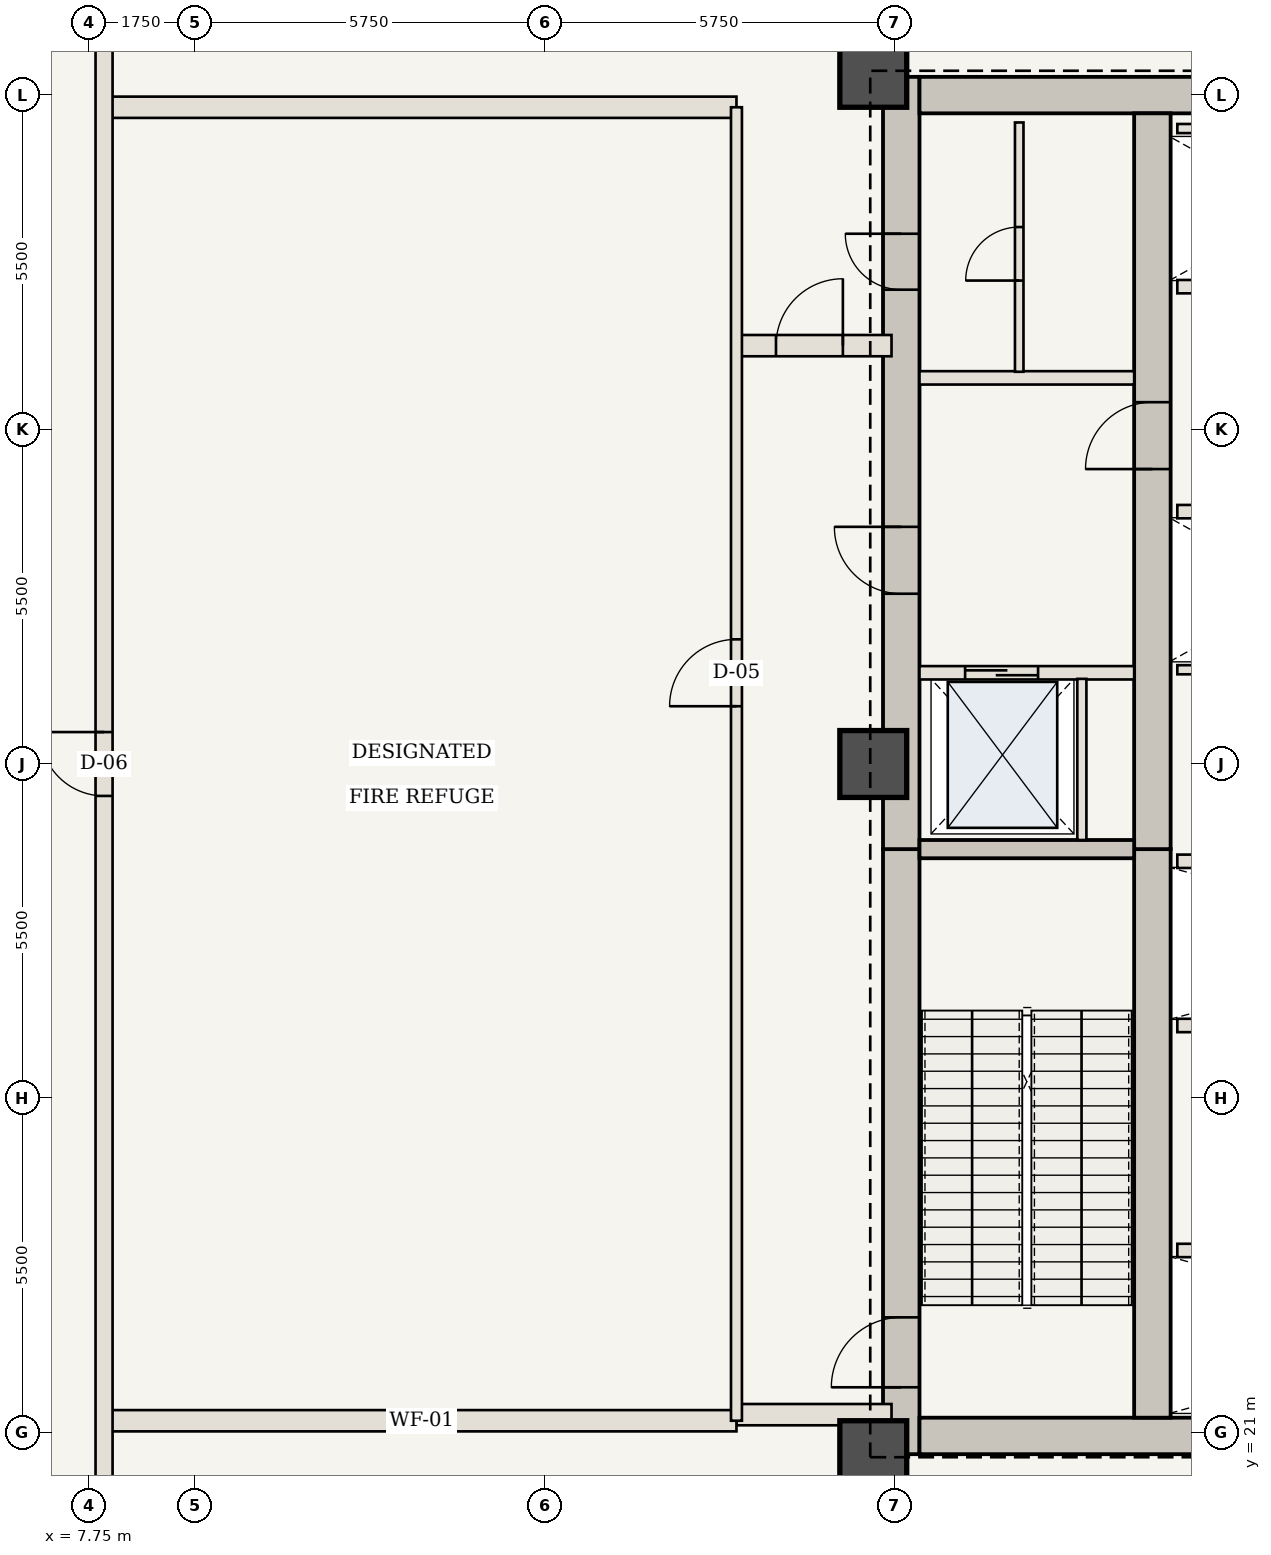
"""IFC4 building model, lengths in metres.
Left out: names, types, materials, properties, quantities, classifications, styles, units other than length and angle.
Written with IfcOpenShell. Run it as: python <this file> out.ifc"""

import sys

from ifc_helpers import new_model, si_unit, direction, frame, frame_2d, origin, origin_2d, place, context, subcontext, project, spatial, rectangle, extrude, element, fill, save


model = new_model("IFC4")
c1 = context("Model", 3, precision=1e-05, world=origin(), true_north=direction((0.0, 1.0)))
c2 = subcontext(c1, "Body", "Model", "MODEL_VIEW")
j1 = project(units=[si_unit("LENGTHUNIT", "METRE"), si_unit("PLANEANGLEUNIT", "RADIAN")], contexts=[c1])
p1 = place(None, origin())
s1 = spatial("IfcSite", under=j1, at=p1, CompositionType="ELEMENT")
p2 = place(p1, origin())
s2 = spatial("IfcBuilding", under=s1, at=p2, CompositionType="ELEMENT")
p3 = place(p2, frame((0.0, 0.0, 99.75)))
s3 = spatial("IfcBuildingStorey", under=s2, at=p3, CompositionType="ELEMENT", Elevation=99.75)
p4 = place(p3, frame((21.11, 20.65, 0.0), z_axis=(0.0, 0.0, 1.0), x_axis=(0.0, 1.0, 0.0)))
e1 = element("IfcWall", 1, at=p4, inside=s3, PredefinedType="SHEAR", context=c2, shape_type="SweptSolid", body=[
    extrude(rectangle(XDim=9.95, YDim=0.6, at=frame_2d((4.975, 0.0))), origin(), (0.0, 0.0, 1.0), 6.3),
])
p5 = place(p4, frame((1.1, 0.0, 0.0)))
e2 = element("IfcOpeningElement", 2, at=p5, cuts=e1, PredefinedType="OPENING", context=c2, shape_type="SweptSolid", body=[
    extrude(rectangle(XDim=1.15, YDim=2.15, at=frame_2d((0.575, 1.075))), frame((0.0, 0.31, 0.0), z_axis=(0.0, -1.0, 0.0), x_axis=(1.0, 0.0, 0.0)), (0.0, 0.0, 1.0), 0.62),
])
p6 = place(p3, frame((21.11, 30.6, 0.0), z_axis=(0.0, 0.0, 1.0), x_axis=(0.0, 1.0, 0.0)))
e3 = element("IfcWall", 3, at=p6, inside=s3, PredefinedType="SHEAR", context=c2, shape_type="SweptSolid", body=[
    extrude(rectangle(XDim=12.7, YDim=0.6, at=frame_2d((6.35, 0.0))), origin(), (0.0, 0.0, 1.0), 6.3),
])
p7 = place(p6, frame((4.2, 0.0, 0.0)))
e4 = element("IfcOpeningElement", 4, at=p7, cuts=e3, PredefinedType="OPENING", context=c2, shape_type="SweptSolid", body=[
    extrude(rectangle(XDim=1.1, YDim=2.15, at=frame_2d((0.55, 1.075))), frame((0.0, 0.31, 0.0), z_axis=(0.0, -1.0, 0.0), x_axis=(1.0, 0.0, 0.0)), (0.0, 0.0, 1.0), 0.62),
])
p8 = place(p6, frame((9.2, 0.0, 0.0)))
e5 = element("IfcOpeningElement", 5, at=p8, cuts=e3, PredefinedType="OPENING", context=c2, shape_type="SweptSolid", body=[
    extrude(rectangle(XDim=0.92, YDim=2.1, at=frame_2d((0.46, 1.05))), frame((0.0, 0.31, 0.0), z_axis=(0.0, -1.0, 0.0), x_axis=(1.0, 0.0, 0.0)), (0.0, 0.0, 1.0), 0.62),
])
p9 = place(p3, frame((21.41, 20.95, 0.0), z_axis=(0.0, 0.0, 1.0), x_axis=(1.0, 0.0, 0.0)))
e6 = element("IfcWall", 6, at=p9, inside=s3, PredefinedType="SHEAR", context=c2, shape_type="SweptSolid", body=[
    extrude(rectangle(XDim=13.74, YDim=0.6, at=frame_2d((6.87, 0.0))), origin(), (0.0, 0.0, 1.0), 6.3),
])
p10 = place(p3, frame((21.41, 43.0, 0.0), z_axis=(0.0, 0.0, 1.0), x_axis=(1.0, 0.0, 0.0)))
e7 = element("IfcWall", 7, at=p10, inside=s3, PredefinedType="SHEAR", context=c2, shape_type="SweptSolid", body=[
    extrude(rectangle(XDim=8.24, YDim=0.6, at=frame_2d((4.12, 0.0))), origin(), (0.0, 0.0, 1.0), 6.3),
])
p11 = place(p3, frame((25.24, 21.25, 0.0), z_axis=(0.0, 0.0, 1.0), x_axis=(0.0, 1.0, 0.0)))
e8 = element("IfcWall", 8, at=p11, inside=s3, PredefinedType="SHEAR", context=c2, shape_type="SweptSolid", body=[
    extrude(rectangle(XDim=9.35, YDim=0.6, at=frame_2d((4.675, 0.0))), origin(), (0.0, 0.0, 1.0), 6.3),
])
p12 = place(p3, frame((25.24, 30.6, 0.0), z_axis=(0.0, 0.0, 1.0), x_axis=(0.0, 1.0, 0.0)))
e9 = element("IfcWall", 9, at=p12, inside=s3, PredefinedType="SHEAR", context=c2, shape_type="SweptSolid", body=[
    extrude(rectangle(XDim=12.1, YDim=0.6, at=frame_2d((6.05, 0.0))), origin(), (0.0, 0.0, 1.0), 6.3),
])
p13 = place(p12, frame((6.25, 0.0, 0.0)))
e10 = element("IfcOpeningElement", 10, at=p13, cuts=e9, PredefinedType="OPENING", context=c2, shape_type="SweptSolid", body=[
    extrude(rectangle(XDim=1.1, YDim=2.15, at=frame_2d((0.55, 1.075))), frame((0.0, 0.31, 0.0), z_axis=(0.0, -1.0, 0.0), x_axis=(1.0, 0.0, 0.0)), (0.0, 0.0, 1.0), 0.62),
])
for number, where, z_axis, x_axis in (
    (11, (20.65, 20.65, 0.0), (0.0, 0.0, 1.0), (1.0, 0.0, 0.0)),
    (12, (20.65, 43.35, 0.0), (0.0, 0.0, 1.0), (1.0, 0.0, 0.0)),
    (13, (20.65, 32.0, 0.0), (0.0, 0.0, 1.0), (1.0, 0.0, 0.0)),
):
    element("IfcColumn", number, at=place(p3, frame(where, z_axis=z_axis, x_axis=x_axis)), inside=s3, PredefinedType="COLUMN", context=c2, shape_type="SweptSolid", body=[
        extrude(rectangle(XDim=1.1, YDim=1.1, at=origin_2d()), origin(), (0.0, 0.0, 1.0), 5.88),
    ])
p14 = place(p3, frame((21.41, 30.6, 0.0), z_axis=(0.0, 0.0, 1.0), x_axis=(1.0, 0.0, 0.0)))
e14 = element("IfcWall", 14, at=p14, inside=s3, PredefinedType="SHEAR", context=c2, shape_type="SweptSolid", body=[
    extrude(rectangle(XDim=3.53, YDim=0.3, at=frame_2d((1.765, 0.0))), origin(), (0.0, 0.0, 1.0), 5.88),
])
p15 = place(p3, frame((21.41, 33.5, 0.0), z_axis=(0.0, 0.0, 1.0), x_axis=(1.0, 0.0, 0.0)))
e15 = element("IfcWall", 15, at=p15, inside=s3, PredefinedType="STANDARD", context=c2, shape_type="SweptSolid", body=[
    extrude(rectangle(XDim=3.53, YDim=0.22, at=frame_2d((1.765, 0.0))), origin(), (0.0, 0.0, 1.0), 5.88),
])
p16 = place(p15, frame((0.75, 0.0, 0.0)))
e16 = element("IfcOpeningElement", 16, at=p16, cuts=e15, PredefinedType="OPENING", context=c2, shape_type="SweptSolid", body=[
    extrude(rectangle(XDim=1.2, YDim=2.2, at=frame_2d((0.6, 1.1))), frame((0.0, 0.12, 0.0), z_axis=(0.0, -1.0, 0.0), x_axis=(1.0, 0.0, 0.0)), (0.0, 0.0, 1.0), 0.24),
])
p17 = place(p3, frame((24.08, 30.75, 0.0), z_axis=(0.0, 0.0, 1.0), x_axis=(0.0, 1.0, 0.0)))
e17 = element("IfcWall", 17, at=p17, inside=s3, PredefinedType="STANDARD", context=c2, shape_type="SweptSolid", body=[
    extrude(rectangle(XDim=2.65, YDim=0.15, at=frame_2d((1.325, 0.0))), origin(), (0.0, 0.0, 1.0), 5.88),
])
p18 = place(p3, frame((21.41, 38.35, 0.0), z_axis=(0.0, 0.0, 1.0), x_axis=(1.0, 0.0, 0.0)))
e18 = element("IfcWall", 18, at=p18, inside=s3, PredefinedType="STANDARD", context=c2, shape_type="SweptSolid", body=[
    extrude(rectangle(XDim=3.53, YDim=0.22, at=frame_2d((1.765, 0.0))), origin(), (0.0, 0.0, 1.0), 5.88),
])
p19 = place(p3, frame((23.05, 38.45, 0.0), z_axis=(0.0, 0.0, 1.0), x_axis=(0.0, 1.0, 0.0)))
e19 = element("IfcWall", 19, at=p19, inside=s3, PredefinedType="STANDARD", context=c2, shape_type="SweptSolid", body=[
    extrude(rectangle(XDim=4.1, YDim=0.14, at=frame_2d((2.05, 0.0))), origin(), (0.0, 0.0, 1.0), 5.88),
])
p20 = place(p19, frame((1.5, 0.0, 0.0)))
e20 = element("IfcOpeningElement", 20, at=p20, cuts=e19, PredefinedType="OPENING", context=c2, shape_type="SweptSolid", body=[
    extrude(rectangle(XDim=0.88, YDim=2.1, at=frame_2d((0.44, 1.05))), frame((0.0, 0.08, 0.0), z_axis=(0.0, -1.0, 0.0), x_axis=(1.0, 0.0, 0.0)), (0.0, 0.0, 1.0), 0.16),
])
for number, where, z_axis, x_axis in (
    (21, (25.65, 24.0, 0.0), (0.0, 0.0, 1.0), (1.0, 0.0, 0.0)),
    (22, (25.65, 27.7, 0.0), (0.0, 0.0, 1.0), (1.0, 0.0, 0.0)),
    (23, (25.65, 30.4, 0.0), (0.0, 0.0, 1.0), (1.0, 0.0, 0.0)),
):
    element("IfcWall", number, at=place(p3, frame(where, z_axis=z_axis, x_axis=x_axis)), inside=s3, PredefinedType="STANDARD", context=c2, shape_type="SweptSolid", body=[
        extrude(rectangle(XDim=9.25, YDim=0.22, at=frame_2d((4.625, 0.0))), origin(), (0.0, 0.0, 1.0), 5.88),
    ])
p21 = place(p3, frame((25.65, 36.15, 0.0), z_axis=(0.0, 0.0, 1.0), x_axis=(1.0, 0.0, 0.0)))
e24 = element("IfcWall", 24, at=p21, inside=s3, PredefinedType="STANDARD", context=c2, shape_type="SweptSolid", body=[
    extrude(rectangle(XDim=4.3, YDim=0.22, at=frame_2d((2.15, 0.0))), origin(), (0.0, 0.0, 1.0), 5.88),
])
p22 = place(p3, frame((25.65, 33.55, 0.0), z_axis=(0.0, 0.0, 1.0), x_axis=(1.0, 0.0, 0.0)))
e25 = element("IfcWall", 25, at=p22, inside=s3, PredefinedType="STANDARD", context=c2, shape_type="SweptSolid", body=[
    extrude(rectangle(XDim=4.2, YDim=0.15, at=frame_2d((2.1, 0.0))), origin(), (0.0, 0.0, 1.0), 5.88),
])
p23 = place(p3, frame((25.65, 39.85, 0.0), z_axis=(0.0, 0.0, 1.0), x_axis=(1.0, 0.0, 0.0)))
e26 = element("IfcWall", 26, at=p23, inside=s3, PredefinedType="STANDARD", context=c2, shape_type="SweptSolid", body=[
    extrude(rectangle(XDim=4.3, YDim=0.22, at=frame_2d((2.15, 0.0))), origin(), (0.0, 0.0, 1.0), 5.88),
])
p24 = place(p3, frame((25.65, 42.45, 0.0), z_axis=(0.0, 0.0, 1.0), x_axis=(1.0, 0.0, 0.0)))
e27 = element("IfcWall", 27, at=p24, inside=s3, PredefinedType="STANDARD", context=c2, shape_type="SweptSolid", body=[
    extrude(rectangle(XDim=4.2, YDim=0.15, at=frame_2d((2.1, 0.0))), origin(), (0.0, 0.0, 1.0), 5.88),
])
p25 = place(p3, frame((18.4, 21.3, 0.0), z_axis=(0.0, 0.0, 1.0), x_axis=(1.0, 0.0, 0.0)))
e28 = element("IfcWall", 28, at=p25, inside=s3, PredefinedType="STANDARD", context=c2, shape_type="SweptSolid", body=[
    extrude(rectangle(XDim=2.55, YDim=0.35, at=frame_2d((1.275, 0.0))), origin(), (0.0, 0.0, 1.0), 3.908),
])
p26 = place(p3, frame((18.4, 38.88, 0.0), z_axis=(0.0, 0.0, 1.0), x_axis=(1.0, 0.0, 0.0)))
e29 = element("IfcWall", 29, at=p26, inside=s3, PredefinedType="STANDARD", context=c2, shape_type="SweptSolid", body=[
    extrude(rectangle(XDim=2.55, YDim=0.35, at=frame_2d((1.275, 0.0))), origin(), (0.0, 0.0, 1.0), 5.88),
])
p27 = place(p26, frame((0.65, 0.0, 0.0)))
e30 = element("IfcOpeningElement", 30, at=p27, cuts=e29, PredefinedType="OPENING", context=c2, shape_type="SweptSolid", body=[
    extrude(rectangle(XDim=1.1, YDim=2.15, at=frame_2d((0.55, 1.075))), frame((0.0, 0.185, 0.0), z_axis=(0.0, -1.0, 0.0), x_axis=(1.0, 0.0, 0.0)), (0.0, 0.0, 1.0), 0.37),
])
for number, where, z_axis, x_axis in (
    (31, (8.05, 21.2, 0.0), (0.0, 0.0, 1.0), (1.0, 0.0, 0.0)),
    (32, (8.05, 42.8, 0.0), (0.0, 0.0, 1.0), (1.0, 0.0, 0.0)),
):
    element("IfcWall", number, at=place(p3, frame(where, z_axis=z_axis, x_axis=x_axis)), inside=s3, PredefinedType="STANDARD", context=c2, shape_type="SweptSolid", body=[
        extrude(rectangle(XDim=10.35, YDim=0.35, at=frame_2d((5.175, 0.0))), origin(), (0.0, 0.0, 1.0), 3.908),
    ])
p28 = place(p3, frame((18.4, 21.2, 0.0), z_axis=(0.0, 0.0, 1.0), x_axis=(0.0, 1.0, 0.0)))
e33 = element("IfcWall", 33, at=p28, inside=s3, PredefinedType="STANDARD", context=c2, shape_type="SweptSolid", body=[
    extrude(rectangle(XDim=21.6, YDim=0.18, at=frame_2d((10.8, 0.0))), origin(), (0.0, 0.0, 1.0), 5.88),
])
p29 = place(p28, frame((11.75, 0.0, 0.0)))
e34 = element("IfcOpeningElement", 34, at=p29, cuts=e33, PredefinedType="OPENING", context=c2, shape_type="SweptSolid", body=[
    extrude(rectangle(XDim=1.1, YDim=2.15, at=frame_2d((0.55, 1.075))), frame((0.0, 0.1, 0.0), z_axis=(0.0, -1.0, 0.0), x_axis=(1.0, 0.0, 0.0)), (0.0, 0.0, 1.0), 0.2),
])
p30 = place(p3, frame((8.0, 8.0, 0.0), z_axis=(0.0, 0.0, 1.0), x_axis=(0.0, 1.0, 0.0)))
e35 = element("IfcWall", 35, at=p30, inside=s3, PredefinedType="USERDEFINED", context=c2, shape_type="SweptSolid", body=[
    extrude(rectangle(XDim=48.0, YDim=0.28, at=frame_2d((24.0, 0.0))), origin(), (0.0, 0.0, 1.0), 3.88),
])
p31 = place(p30, frame((23.475, 0.0, 0.0)))
e36 = element("IfcOpeningElement", 36, at=p31, cuts=e35, PredefinedType="OPENING", context=c2, shape_type="SweptSolid", body=[
    extrude(rectangle(XDim=1.05, YDim=2.2, at=frame_2d((0.525, 1.1))), frame((0.0, 0.15, 0.0), z_axis=(0.0, -1.0, 0.0), x_axis=(1.0, 0.0, 0.0)), (0.0, 0.0, 1.0), 0.3),
])
p32 = place(p5, origin())
e37 = element("IfcDoor", 37, at=p32, inside=s3, OperationType="SINGLE_SWING_LEFT", PredefinedType="DOOR", context=c2, shape_type="SweptSolid", body=[
    extrude(rectangle(XDim=1.15, YDim=2.15, at=frame_2d((0.575, 1.075))), frame((0.0, 0.025, 0.0), z_axis=(0.0, -1.0, 0.0), x_axis=(1.0, 0.0, 0.0)), (0.0, 0.0, 1.0), 0.05),
])
fill(e2, e37)
p33 = place(p7, origin())
e38 = element("IfcDoor", 38, at=p33, inside=s3, OperationType="SINGLE_SWING_RIGHT", PredefinedType="DOOR", context=c2, shape_type="SweptSolid", body=[
    extrude(rectangle(XDim=1.1, YDim=2.15, at=frame_2d((0.55, 1.075))), frame((0.0, 0.025, 0.0), z_axis=(0.0, -1.0, 0.0), x_axis=(1.0, 0.0, 0.0)), (0.0, 0.0, 1.0), 0.05),
])
fill(e4, e38)
p34 = place(p13, origin())
e39 = element("IfcDoor", 39, at=p34, inside=s3, OperationType="SINGLE_SWING_LEFT", PredefinedType="DOOR", context=c2, shape_type="SweptSolid", body=[
    extrude(rectangle(XDim=1.1, YDim=2.15, at=frame_2d((0.55, 1.075))), frame((0.0, 0.025, 0.0), z_axis=(0.0, -1.0, 0.0), x_axis=(1.0, 0.0, 0.0)), (0.0, 0.0, 1.0), 0.05),
])
fill(e10, e39)
p35 = place(p8, origin())
e40 = element("IfcDoor", 40, at=p35, inside=s3, OperationType="SINGLE_SWING_RIGHT", PredefinedType="DOOR", context=c2, shape_type="SweptSolid", body=[
    extrude(rectangle(XDim=0.92, YDim=2.1, at=frame_2d((0.46, 1.05))), frame((0.0, 0.025, 0.0), z_axis=(0.0, -1.0, 0.0), x_axis=(1.0, 0.0, 0.0)), (0.0, 0.0, 1.0), 0.05),
])
fill(e5, e40)
p36 = place(p16, origin())
e41 = element("IfcDoor", 41, at=p36, inside=s3, OperationType="DOUBLE_DOOR_SLIDING", PredefinedType="DOOR", context=c2, shape_type="SweptSolid", body=[
    extrude(rectangle(XDim=1.2, YDim=2.2, at=frame_2d((0.6, 1.1))), frame((0.0, 0.025, 0.0), z_axis=(0.0, -1.0, 0.0), x_axis=(1.0, 0.0, 0.0)), (0.0, 0.0, 1.0), 0.05),
])
fill(e16, e41)
p37 = place(p20, origin())
e42 = element("IfcDoor", 42, at=p37, inside=s3, OperationType="SINGLE_SWING_LEFT", PredefinedType="DOOR", context=c2, shape_type="SweptSolid", body=[
    extrude(rectangle(XDim=0.88, YDim=2.1, at=frame_2d((0.44, 1.05))), frame((0.0, 0.025, 0.0), z_axis=(0.0, -1.0, 0.0), x_axis=(1.0, 0.0, 0.0)), (0.0, 0.0, 1.0), 0.05),
])
fill(e20, e42)
p38 = place(p27, origin())
e43 = element("IfcDoor", 43, at=p38, inside=s3, OperationType="SINGLE_SWING_RIGHT", PredefinedType="DOOR", context=c2, shape_type="SweptSolid", body=[
    extrude(rectangle(XDim=1.1, YDim=2.15, at=frame_2d((0.55, 1.075))), frame((0.0, 0.025, 0.0), z_axis=(0.0, -1.0, 0.0), x_axis=(1.0, 0.0, 0.0)), (0.0, 0.0, 1.0), 0.05),
])
fill(e30, e43)
p39 = place(p29, origin())
e44 = element("IfcDoor", 44, at=p39, inside=s3, OperationType="SINGLE_SWING_LEFT", PredefinedType="DOOR", context=c2, shape_type="SweptSolid", body=[
    extrude(rectangle(XDim=1.1, YDim=2.15, at=frame_2d((0.55, 1.075))), frame((0.0, 0.025, 0.0), z_axis=(0.0, -1.0, 0.0), x_axis=(1.0, 0.0, 0.0)), (0.0, 0.0, 1.0), 0.05),
])
fill(e34, e44)
p40 = place(p31, origin())
e45 = element("IfcDoor", 45, at=p40, inside=s3, OperationType="SINGLE_SWING_RIGHT", PredefinedType="DOOR", context=c2, shape_type="SweptSolid", body=[
    extrude(rectangle(XDim=1.05, YDim=2.2, at=frame_2d((0.525, 1.1))), frame((0.0, 0.025, 0.0), z_axis=(0.0, -1.0, 0.0), x_axis=(1.0, 0.0, 0.0)), (0.0, 0.0, 1.0), 0.05),
])
fill(e36, e45)
save(model, sys.argv[1])
